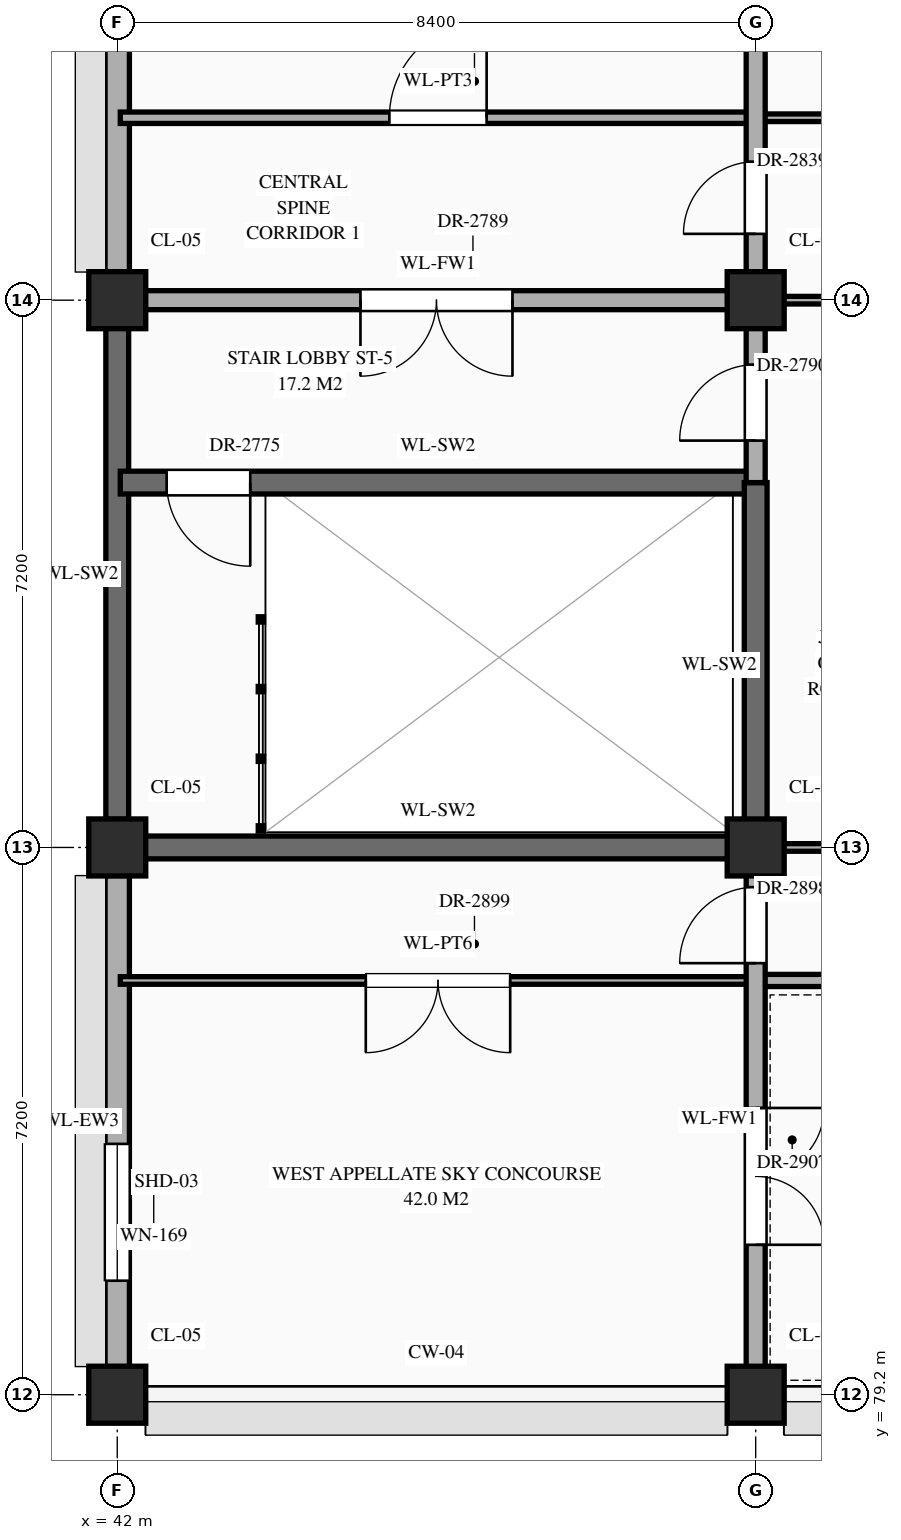
"""IFC4 building model, lengths in metres.
Left out: names, types, materials, properties, quantities, classifications, styles, units other than length and angle.
Written with IfcOpenShell. Run it as: python <this file> out.ifc"""

import sys

from ifc_helpers import new_model, si_unit, direction, frame, frame_2d, origin, origin_2d, place, context, subcontext, project, spatial, rectangle, extrude, element, fill, save


model = new_model("IFC4")
c1 = context("Model", 3, precision=1e-05, world=origin(), true_north=direction((0.0, 1.0)))
c2 = subcontext(c1, "Body", "Model", "MODEL_VIEW")
j1 = project(units=[si_unit("LENGTHUNIT", "METRE"), si_unit("PLANEANGLEUNIT", "RADIAN")], contexts=[c1])
p1 = place(None, origin())
s1 = spatial("IfcSite", under=j1, at=p1, CompositionType="ELEMENT")
p2 = place(p1, origin())
s2 = spatial("IfcBuilding", under=s1, at=p2, CompositionType="ELEMENT")
p3 = place(p2, frame((0.0, 0.0, 43.5)))
s3 = spatial("IfcBuildingStorey", under=s2, at=p3, CompositionType="ELEMENT", Elevation=43.5)
for number, where, z_axis, x_axis in (
    (1, (42.0, 79.2, 0.0), (0.0, 0.0, 1.0), (1.0, 0.0, 0.0)),
    (2, (42.0, 86.4, 0.0), (0.0, 0.0, 1.0), (1.0, 0.0, 0.0)),
    (3, (42.0, 93.6, 0.0), (0.0, 0.0, 1.0), (1.0, 0.0, 0.0)),
    (4, (50.4, 79.2, 0.0), (0.0, 0.0, 1.0), (1.0, 0.0, 0.0)),
    (5, (50.4, 86.4, 0.0), (0.0, 0.0, 1.0), (1.0, 0.0, 0.0)),
    (6, (50.4, 93.6, 0.0), (0.0, 0.0, 1.0), (1.0, 0.0, 0.0)),
):
    element("IfcColumn", number, at=place(p3, frame(where, z_axis=z_axis, x_axis=x_axis)), inside=s3, PredefinedType="COLUMN", context=c2, shape_type="SweptSolid", body=[
        extrude(rectangle(XDim=0.75, YDim=0.75, at=origin_2d()), origin(), (0.0, 0.0, 1.0), 4.2),
    ])
p4 = place(p3, frame((42.0, 79.57, 0.0), z_axis=(0.0, 0.0, 1.0), x_axis=(0.0, 1.0, 0.0)))
e7 = element("IfcWall", 7, at=p4, inside=s3, PredefinedType="STANDARD", context=c2, shape_type="SweptSolid", body=[
    extrude(rectangle(XDim=6.46, YDim=0.32, at=frame_2d((3.23, 0.0))), origin(), (0.0, 0.0, 1.0), 3.35),
])
p5 = place(p4, frame((1.13, 0.0, 0.85)))
e8 = element("IfcOpeningElement", 8, at=p5, cuts=e7, PredefinedType="OPENING", context=c2, shape_type="SweptSolid", body=[
    extrude(rectangle(XDim=1.8, YDim=1.92, at=frame_2d((0.9, 0.96))), frame((0.0, 0.172, 0.0), z_axis=(0.0, -1.0, 0.0), x_axis=(1.0, 0.0, 0.0)), (0.0, 0.0, 1.0), 0.344),
])
p6 = place(p3, frame((42.0, 86.77, 0.0), z_axis=(0.0, 0.0, 1.0), x_axis=(0.0, 1.0, 0.0)))
e9 = element("IfcWall", 9, at=p6, inside=s3, PredefinedType="SHEAR", context=c2, shape_type="SweptSolid", body=[
    extrude(rectangle(XDim=6.46, YDim=0.3, at=frame_2d((3.23, 0.0))), origin(), (0.0, 0.0, 1.0), 4.0),
])
p7 = place(p3, frame((42.0, 93.97, 0.0), z_axis=(0.0, 0.0, 1.0), x_axis=(0.0, 1.0, 0.0)))
e10 = element("IfcWall", 10, at=p7, inside=s3, PredefinedType="STANDARD", context=c2, shape_type="SweptSolid", body=[
    extrude(rectangle(XDim=6.46, YDim=0.32, at=frame_2d((3.23, 0.0))), origin(), (0.0, 0.0, 1.0), 3.35),
])
p8 = place(p7, frame((3.93, 0.0, 0.85)))
e11 = element("IfcOpeningElement", 11, at=p8, cuts=e10, PredefinedType="OPENING", context=c2, shape_type="SweptSolid", body=[
    extrude(rectangle(XDim=1.2, YDim=1.2, at=frame_2d((0.6, 0.6))), frame((0.0, 0.172, 0.0), z_axis=(0.0, -1.0, 0.0), x_axis=(1.0, 0.0, 0.0)), (0.0, 0.0, 1.0), 0.344),
])
p9 = place(p3, frame((42.04, 84.65, 0.0), z_axis=(0.0, 0.0, 1.0), x_axis=(1.0, 0.0, 0.0)))
e12 = element("IfcWall", 12, at=p9, inside=s3, PredefinedType="STANDARD", context=c2, shape_type="SweptSolid", body=[
    extrude(rectangle(XDim=8.36, YDim=0.1, at=frame_2d((4.18, 0.0))), origin(), (0.0, 0.0, 1.0), 4.0),
])
p10 = place(p9, frame((3.23, 0.0, 0.0)))
e13 = element("IfcOpeningElement", 13, at=p10, cuts=e12, PredefinedType="OPENING", context=c2, shape_type="SweptSolid", body=[
    extrude(rectangle(XDim=1.9, YDim=2.5, at=frame_2d((0.95, 1.25))), frame((0.0, 0.062, 0.0), z_axis=(0.0, -1.0, 0.0), x_axis=(1.0, 0.0, 0.0)), (0.0, 0.0, 1.0), 0.124),
])
p11 = place(p3, frame((50.4, 84.65, 0.0), z_axis=(0.0, 0.0, 1.0), x_axis=(1.0, 0.0, 0.0)))
e14 = element("IfcWall", 14, at=p11, inside=s3, PredefinedType="STANDARD", context=c2, shape_type="SweptSolid", body=[
    extrude(rectangle(XDim=16.8, YDim=0.16, at=frame_2d((8.4, 0.0))), origin(), (0.0, 0.0, 1.0), 3.95),
])
p12 = place(p11, frame((7.575, 0.0, 0.0)))
e15 = element("IfcOpeningElement", 15, at=p12, cuts=e14, PredefinedType="OPENING", context=c2, shape_type="SweptSolid", body=[
    extrude(rectangle(XDim=1.65, YDim=2.4, at=frame_2d((0.825, 1.2))), frame((0.0, 0.092, 0.0), z_axis=(0.0, -1.0, 0.0), x_axis=(1.0, 0.0, 0.0)), (0.0, 0.0, 1.0), 0.184),
])
p13 = place(p3, frame((42.04, 86.4, 0.0), z_axis=(0.0, 0.0, 1.0), x_axis=(1.0, 0.0, 0.0)))
e16 = element("IfcWall", 16, at=p13, inside=s3, PredefinedType="SHEAR", context=c2, shape_type="SweptSolid", body=[
    extrude(rectangle(XDim=8.36, YDim=0.3, at=frame_2d((4.18, 0.0))), origin(), (0.0, 0.0, 1.0), 4.0),
])
p14 = place(p3, frame((50.4, 86.4, 0.0), z_axis=(0.0, 0.0, 1.0), x_axis=(1.0, 0.0, 0.0)))
e17 = element("IfcWall", 17, at=p14, inside=s3, PredefinedType="STANDARD", context=c2, shape_type="SweptSolid", body=[
    extrude(rectangle(XDim=8.4, YDim=0.1, at=frame_2d((4.2, 0.0))), origin(), (0.0, 0.0, 1.0), 3.1),
])
p15 = place(p14, frame((0.907, 0.0, 0.0)))
e18 = element("IfcOpeningElement", 18, at=p15, cuts=e17, PredefinedType="OPENING", context=c2, shape_type="SweptSolid", body=[
    extrude(rectangle(XDim=1.28, YDim=2.35, at=frame_2d((0.64, 1.175))), frame((0.0, 0.062, 0.0), z_axis=(0.0, -1.0, 0.0), x_axis=(1.0, 0.0, 0.0)), (0.0, 0.0, 1.0), 0.124),
])
p16 = place(p14, frame((3.71, 0.0, 0.0)))
e19 = element("IfcOpeningElement", 19, at=p16, cuts=e17, PredefinedType="OPENING", context=c2, shape_type="SweptSolid", body=[
    extrude(rectangle(XDim=0.98, YDim=2.35, at=frame_2d((0.49, 1.175))), frame((0.0, 0.062, 0.0), z_axis=(0.0, -1.0, 0.0), x_axis=(1.0, 0.0, 0.0)), (0.0, 0.0, 1.0), 0.124),
])
p17 = place(p14, frame((6.343, 0.0, 0.0)))
e20 = element("IfcOpeningElement", 20, at=p17, cuts=e17, PredefinedType="OPENING", context=c2, shape_type="SweptSolid", body=[
    extrude(rectangle(XDim=1.02, YDim=2.4, at=frame_2d((0.51, 1.2))), frame((0.0, 0.062, 0.0), z_axis=(0.0, -1.0, 0.0), x_axis=(1.0, 0.0, 0.0)), (0.0, 0.0, 1.0), 0.124),
])
p18 = place(p3, frame((42.04, 91.2, 0.0), z_axis=(0.0, 0.0, 1.0), x_axis=(1.0, 0.0, 0.0)))
e21 = element("IfcWall", 21, at=p18, inside=s3, PredefinedType="SHEAR", context=c2, shape_type="SweptSolid", body=[
    extrude(rectangle(XDim=8.36, YDim=0.3, at=frame_2d((4.18, 0.0))), origin(), (0.0, 0.0, 1.0), 4.0),
])
p19 = place(p18, frame((0.61, 0.0, 0.0)))
e22 = element("IfcOpeningElement", 22, at=p19, cuts=e21, PredefinedType="OPENING", context=c2, shape_type="SweptSolid", body=[
    extrude(rectangle(XDim=1.1, YDim=2.2, at=frame_2d((0.55, 1.1))), frame((0.0, 0.162, 0.0), z_axis=(0.0, -1.0, 0.0), x_axis=(1.0, 0.0, 0.0)), (0.0, 0.0, 1.0), 0.324),
])
p20 = place(p3, frame((42.04, 93.6, 0.0), z_axis=(0.0, 0.0, 1.0), x_axis=(1.0, 0.0, 0.0)))
e23 = element("IfcWall", 23, at=p20, inside=s3, PredefinedType="STANDARD", context=c2, shape_type="SweptSolid", body=[
    extrude(rectangle(XDim=8.36, YDim=0.25, at=frame_2d((4.18, 0.0))), origin(), (0.0, 0.0, 1.0), 3.15),
])
p21 = place(p20, frame((3.16, 0.0, 0.0)))
e24 = element("IfcOpeningElement", 24, at=p21, cuts=e23, PredefinedType="OPENING", context=c2, shape_type="SweptSolid", body=[
    extrude(rectangle(XDim=2.0, YDim=2.4, at=frame_2d((1.0, 1.2))), frame((0.0, 0.137, 0.0), z_axis=(0.0, -1.0, 0.0), x_axis=(1.0, 0.0, 0.0)), (0.0, 0.0, 1.0), 0.274),
])
p22 = place(p3, frame((50.4, 93.6, 0.0), z_axis=(0.0, 0.0, 1.0), x_axis=(1.0, 0.0, 0.0)))
e25 = element("IfcWall", 25, at=p22, inside=s3, PredefinedType="STANDARD", context=c2, shape_type="SweptSolid", body=[
    extrude(rectangle(XDim=8.4, YDim=0.1, at=frame_2d((4.2, 0.0))), origin(), (0.0, 0.0, 1.0), 3.1),
])
p23 = place(p22, frame((1.087, 0.0, 0.0)))
e26 = element("IfcOpeningElement", 26, at=p23, cuts=e25, PredefinedType="OPENING", context=c2, shape_type="SweptSolid", body=[
    extrude(rectangle(XDim=0.92, YDim=2.15, at=frame_2d((0.46, 1.075))), frame((0.0, 0.062, 0.0), z_axis=(0.0, -1.0, 0.0), x_axis=(1.0, 0.0, 0.0)), (0.0, 0.0, 1.0), 0.124),
])
p24 = place(p22, frame((3.72, 0.0, 0.0)))
e27 = element("IfcOpeningElement", 27, at=p24, cuts=e25, PredefinedType="OPENING", context=c2, shape_type="SweptSolid", body=[
    extrude(rectangle(XDim=0.96, YDim=2.2, at=frame_2d((0.48, 1.1))), frame((0.0, 0.062, 0.0), z_axis=(0.0, -1.0, 0.0), x_axis=(1.0, 0.0, 0.0)), (0.0, 0.0, 1.0), 0.124),
])
p25 = place(p22, frame((6.353, 0.0, 0.0)))
e28 = element("IfcOpeningElement", 28, at=p25, cuts=e25, PredefinedType="OPENING", context=c2, shape_type="SweptSolid", body=[
    extrude(rectangle(XDim=1.0, YDim=2.25, at=frame_2d((0.5, 1.125))), frame((0.0, 0.062, 0.0), z_axis=(0.0, -1.0, 0.0), x_axis=(1.0, 0.0, 0.0)), (0.0, 0.0, 1.0), 0.124),
])
p26 = place(p3, frame((42.04, 96.0, 0.0), z_axis=(0.0, 0.0, 1.0), x_axis=(1.0, 0.0, 0.0)))
e29 = element("IfcWall", 29, at=p26, inside=s3, PredefinedType="STANDARD", context=c2, shape_type="SweptSolid", body=[
    extrude(rectangle(XDim=8.36, YDim=0.15, at=frame_2d((4.18, 0.0))), origin(), (0.0, 0.0, 1.0), 4.0),
])
p27 = place(p26, frame((3.54, 0.0, 0.0)))
e30 = element("IfcOpeningElement", 30, at=p27, cuts=e29, PredefinedType="OPENING", context=c2, shape_type="SweptSolid", body=[
    extrude(rectangle(XDim=1.28, YDim=2.35, at=frame_2d((0.64, 1.175))), frame((0.0, 0.087, 0.0), z_axis=(0.0, -1.0, 0.0), x_axis=(1.0, 0.0, 0.0)), (0.0, 0.0, 1.0), 0.174),
])
p28 = place(p3, frame((50.4, 96.0, 0.0), z_axis=(0.0, 0.0, 1.0), x_axis=(1.0, 0.0, 0.0)))
e31 = element("IfcWall", 31, at=p28, inside=s3, PredefinedType="STANDARD", context=c2, shape_type="SweptSolid", body=[
    extrude(rectangle(XDim=5.8, YDim=0.1, at=frame_2d((2.9, 0.0))), origin(), (0.0, 0.0, 1.0), 3.95),
])
p29 = place(p28, frame((1.21, 0.0, 0.0)))
e32 = element("IfcOpeningElement", 32, at=p29, cuts=e31, PredefinedType="OPENING", context=c2, shape_type="SweptSolid", body=[
    extrude(rectangle(XDim=0.98, YDim=2.35, at=frame_2d((0.49, 1.175))), frame((0.0, 0.062, 0.0), z_axis=(0.0, -1.0, 0.0), x_axis=(1.0, 0.0, 0.0)), (0.0, 0.0, 1.0), 0.124),
])
p30 = place(p28, frame((4.09, 0.0, 0.0)))
e33 = element("IfcOpeningElement", 33, at=p30, cuts=e31, PredefinedType="OPENING", context=c2, shape_type="SweptSolid", body=[
    extrude(rectangle(XDim=1.02, YDim=2.4, at=frame_2d((0.51, 1.2))), frame((0.0, 0.062, 0.0), z_axis=(0.0, -1.0, 0.0), x_axis=(1.0, 0.0, 0.0)), (0.0, 0.0, 1.0), 0.124),
])
p31 = place(p3, frame((50.4, 79.24, 0.0), z_axis=(0.0, 0.0, 1.0), x_axis=(0.0, 1.0, 0.0)))
e34 = element("IfcWall", 34, at=p31, inside=s3, PredefinedType="STANDARD", context=c2, shape_type="SweptSolid", body=[
    extrude(rectangle(XDim=7.16, YDim=0.25, at=frame_2d((3.58, 0.0))), origin(), (0.0, 0.0, 1.0), 3.2),
])
p32 = place(p31, frame((5.637, 0.0, 0.0)))
e35 = element("IfcOpeningElement", 35, at=p32, cuts=e34, PredefinedType="OPENING", context=c2, shape_type="SweptSolid", body=[
    extrude(rectangle(XDim=1.0, YDim=2.2, at=frame_2d((0.5, 1.1))), frame((0.0, 0.137, 0.0), z_axis=(0.0, -1.0, 0.0), x_axis=(1.0, 0.0, 0.0)), (0.0, 0.0, 1.0), 0.274),
])
p33 = place(p31, frame((1.933, 0.0, 0.0)))
e36 = element("IfcOpeningElement", 36, at=p33, cuts=e34, PredefinedType="OPENING", context=c2, shape_type="SweptSolid", body=[
    extrude(rectangle(XDim=1.8, YDim=2.35, at=frame_2d((0.9, 1.175))), frame((0.0, 0.137, 0.0), z_axis=(0.0, -1.0, 0.0), x_axis=(1.0, 0.0, 0.0)), (0.0, 0.0, 1.0), 0.274),
])
p34 = place(p3, frame((50.4, 86.4, 0.0), z_axis=(0.0, 0.0, 1.0), x_axis=(0.0, 1.0, 0.0)))
e37 = element("IfcWall", 37, at=p34, inside=s3, PredefinedType="SHEAR", context=c2, shape_type="SweptSolid", body=[
    extrude(rectangle(XDim=4.8, YDim=0.3, at=frame_2d((2.4, 0.0))), origin(), (0.0, 0.0, 1.0), 4.0),
])
p35 = place(p3, frame((50.4, 91.2, 0.0), z_axis=(0.0, 0.0, 1.0), x_axis=(0.0, 1.0, 0.0)))
e38 = element("IfcWall", 38, at=p35, inside=s3, PredefinedType="STANDARD", context=c2, shape_type="SweptSolid", body=[
    extrude(rectangle(XDim=13.2, YDim=0.25, at=frame_2d((6.6, 0.0))), origin(), (0.0, 0.0, 1.0), 3.2),
])
p36 = place(p35, frame((0.552, 0.0, 0.0)))
e39 = element("IfcOpeningElement", 39, at=p36, cuts=e38, PredefinedType="OPENING", context=c2, shape_type="SweptSolid", body=[
    extrude(rectangle(XDim=1.0, YDim=2.2, at=frame_2d((0.5, 1.1))), frame((0.0, 0.137, 0.0), z_axis=(0.0, -1.0, 0.0), x_axis=(1.0, 0.0, 0.0)), (0.0, 0.0, 1.0), 0.274),
])
p37 = place(p35, frame((10.448, 0.0, 0.0)))
e40 = element("IfcOpeningElement", 40, at=p37, cuts=e38, PredefinedType="OPENING", context=c2, shape_type="SweptSolid", body=[
    extrude(rectangle(XDim=1.0, YDim=2.2, at=frame_2d((0.5, 1.1))), frame((0.0, 0.137, 0.0), z_axis=(0.0, -1.0, 0.0), x_axis=(1.0, 0.0, 0.0)), (0.0, 0.0, 1.0), 0.274),
])
p38 = place(p35, frame((3.272, 0.0, 0.0)))
e41 = element("IfcOpeningElement", 41, at=p38, cuts=e38, PredefinedType="OPENING", context=c2, shape_type="SweptSolid", body=[
    extrude(rectangle(XDim=0.95, YDim=2.15, at=frame_2d((0.475, 1.075))), frame((0.0, 0.137, 0.0), z_axis=(0.0, -1.0, 0.0), x_axis=(1.0, 0.0, 0.0)), (0.0, 0.0, 1.0), 0.274),
])
p39 = place(p5, origin())
e42 = element("IfcWindow", 42, at=p39, inside=s3, PartitioningType="SINGLE_PANEL", PredefinedType="WINDOW", context=c2, shape_type="SweptSolid", body=[
    extrude(rectangle(XDim=1.8, YDim=1.92, at=frame_2d((0.9, 0.96))), frame((0.0, 0.03, 0.0), z_axis=(0.0, -1.0, 0.0), x_axis=(1.0, 0.0, 0.0)), (0.0, 0.0, 1.0), 0.06),
])
fill(e8, e42)
p40 = place(p19, frame((1.1, 0.0, 0.0), z_axis=(0.0, 0.0, 1.0), x_axis=(-1.0, 0.0, 0.0)))
e43 = element("IfcDoor", 43, at=p40, inside=s3, OperationType="SINGLE_SWING_LEFT", PredefinedType="DOOR", context=c2, shape_type="SweptSolid", body=[
    extrude(rectangle(XDim=1.1, YDim=2.2, at=frame_2d((0.55, 1.1))), frame((0.0, 0.025, 0.0), z_axis=(0.0, -1.0, 0.0), x_axis=(1.0, 0.0, 0.0)), (0.0, 0.0, 1.0), 0.05),
])
fill(e22, e43)
p41 = place(p21, frame((2.0, 0.0, 0.0), z_axis=(0.0, 0.0, 1.0), x_axis=(-1.0, 0.0, 0.0)))
e44 = element("IfcDoor", 44, at=p41, inside=s3, OperationType="DOUBLE_DOOR_SINGLE_SWING", PredefinedType="DOOR", context=c2, shape_type="SweptSolid", body=[
    extrude(rectangle(XDim=2.0, YDim=2.4, at=frame_2d((1.0, 1.2))), frame((0.0, 0.025, 0.0), z_axis=(0.0, -1.0, 0.0), x_axis=(1.0, 0.0, 0.0)), (0.0, 0.0, 1.0), 0.05),
])
fill(e24, e44)
p42 = place(p36, origin())
e45 = element("IfcDoor", 45, at=p42, inside=s3, OperationType="SINGLE_SWING_LEFT", PredefinedType="DOOR", context=c2, shape_type="SweptSolid", body=[
    extrude(rectangle(XDim=1.0, YDim=2.2, at=frame_2d((0.5, 1.1))), frame((0.0, 0.025, 0.0), z_axis=(0.0, -1.0, 0.0), x_axis=(1.0, 0.0, 0.0)), (0.0, 0.0, 1.0), 0.05),
])
fill(e39, e45)
p43 = place(p38, origin())
e46 = element("IfcDoor", 46, at=p43, inside=s3, OperationType="SINGLE_SWING_LEFT", PredefinedType="DOOR", context=c2, shape_type="SweptSolid", body=[
    extrude(rectangle(XDim=0.95, YDim=2.15, at=frame_2d((0.475, 1.075))), frame((0.0, 0.025, 0.0), z_axis=(0.0, -1.0, 0.0), x_axis=(1.0, 0.0, 0.0)), (0.0, 0.0, 1.0), 0.05),
])
fill(e41, e46)
p44 = place(p27, origin())
e47 = element("IfcDoor", 47, at=p44, inside=s3, OperationType="SINGLE_SWING_RIGHT", PredefinedType="DOOR", context=c2, shape_type="SweptSolid", body=[
    extrude(rectangle(XDim=1.28, YDim=2.35, at=frame_2d((0.64, 1.175))), frame((0.0, 0.025, 0.0), z_axis=(0.0, -1.0, 0.0), x_axis=(1.0, 0.0, 0.0)), (0.0, 0.0, 1.0), 0.05),
])
fill(e30, e47)
p45 = place(p32, origin())
e48 = element("IfcDoor", 48, at=p45, inside=s3, OperationType="SINGLE_SWING_LEFT", PredefinedType="DOOR", context=c2, shape_type="SweptSolid", body=[
    extrude(rectangle(XDim=1.0, YDim=2.2, at=frame_2d((0.5, 1.1))), frame((0.0, 0.025, 0.0), z_axis=(0.0, -1.0, 0.0), x_axis=(1.0, 0.0, 0.0)), (0.0, 0.0, 1.0), 0.05),
])
fill(e35, e48)
p46 = place(p10, frame((1.9, 0.0, 0.0), z_axis=(0.0, 0.0, 1.0), x_axis=(-1.0, 0.0, 0.0)))
e49 = element("IfcDoor", 49, at=p46, inside=s3, OperationType="DOUBLE_DOOR_SINGLE_SWING", PredefinedType="DOOR", context=c2, shape_type="SweptSolid", body=[
    extrude(rectangle(XDim=1.9, YDim=2.5, at=frame_2d((0.95, 1.25))), frame((0.0, 0.025, 0.0), z_axis=(0.0, -1.0, 0.0), x_axis=(1.0, 0.0, 0.0)), (0.0, 0.0, 1.0), 0.05),
])
fill(e13, e49)
p47 = place(p33, frame((1.8, 0.0, 0.0), z_axis=(0.0, 0.0, 1.0), x_axis=(-1.0, 0.0, 0.0)))
e50 = element("IfcDoor", 50, at=p47, inside=s3, OperationType="DOUBLE_DOOR_SINGLE_SWING", PredefinedType="DOOR", context=c2, shape_type="SweptSolid", body=[
    extrude(rectangle(XDim=1.8, YDim=2.35, at=frame_2d((0.9, 1.175))), frame((0.0, 0.025, 0.0), z_axis=(0.0, -1.0, 0.0), x_axis=(1.0, 0.0, 0.0)), (0.0, 0.0, 1.0), 0.05),
])
fill(e36, e50)
save(model, sys.argv[1])
